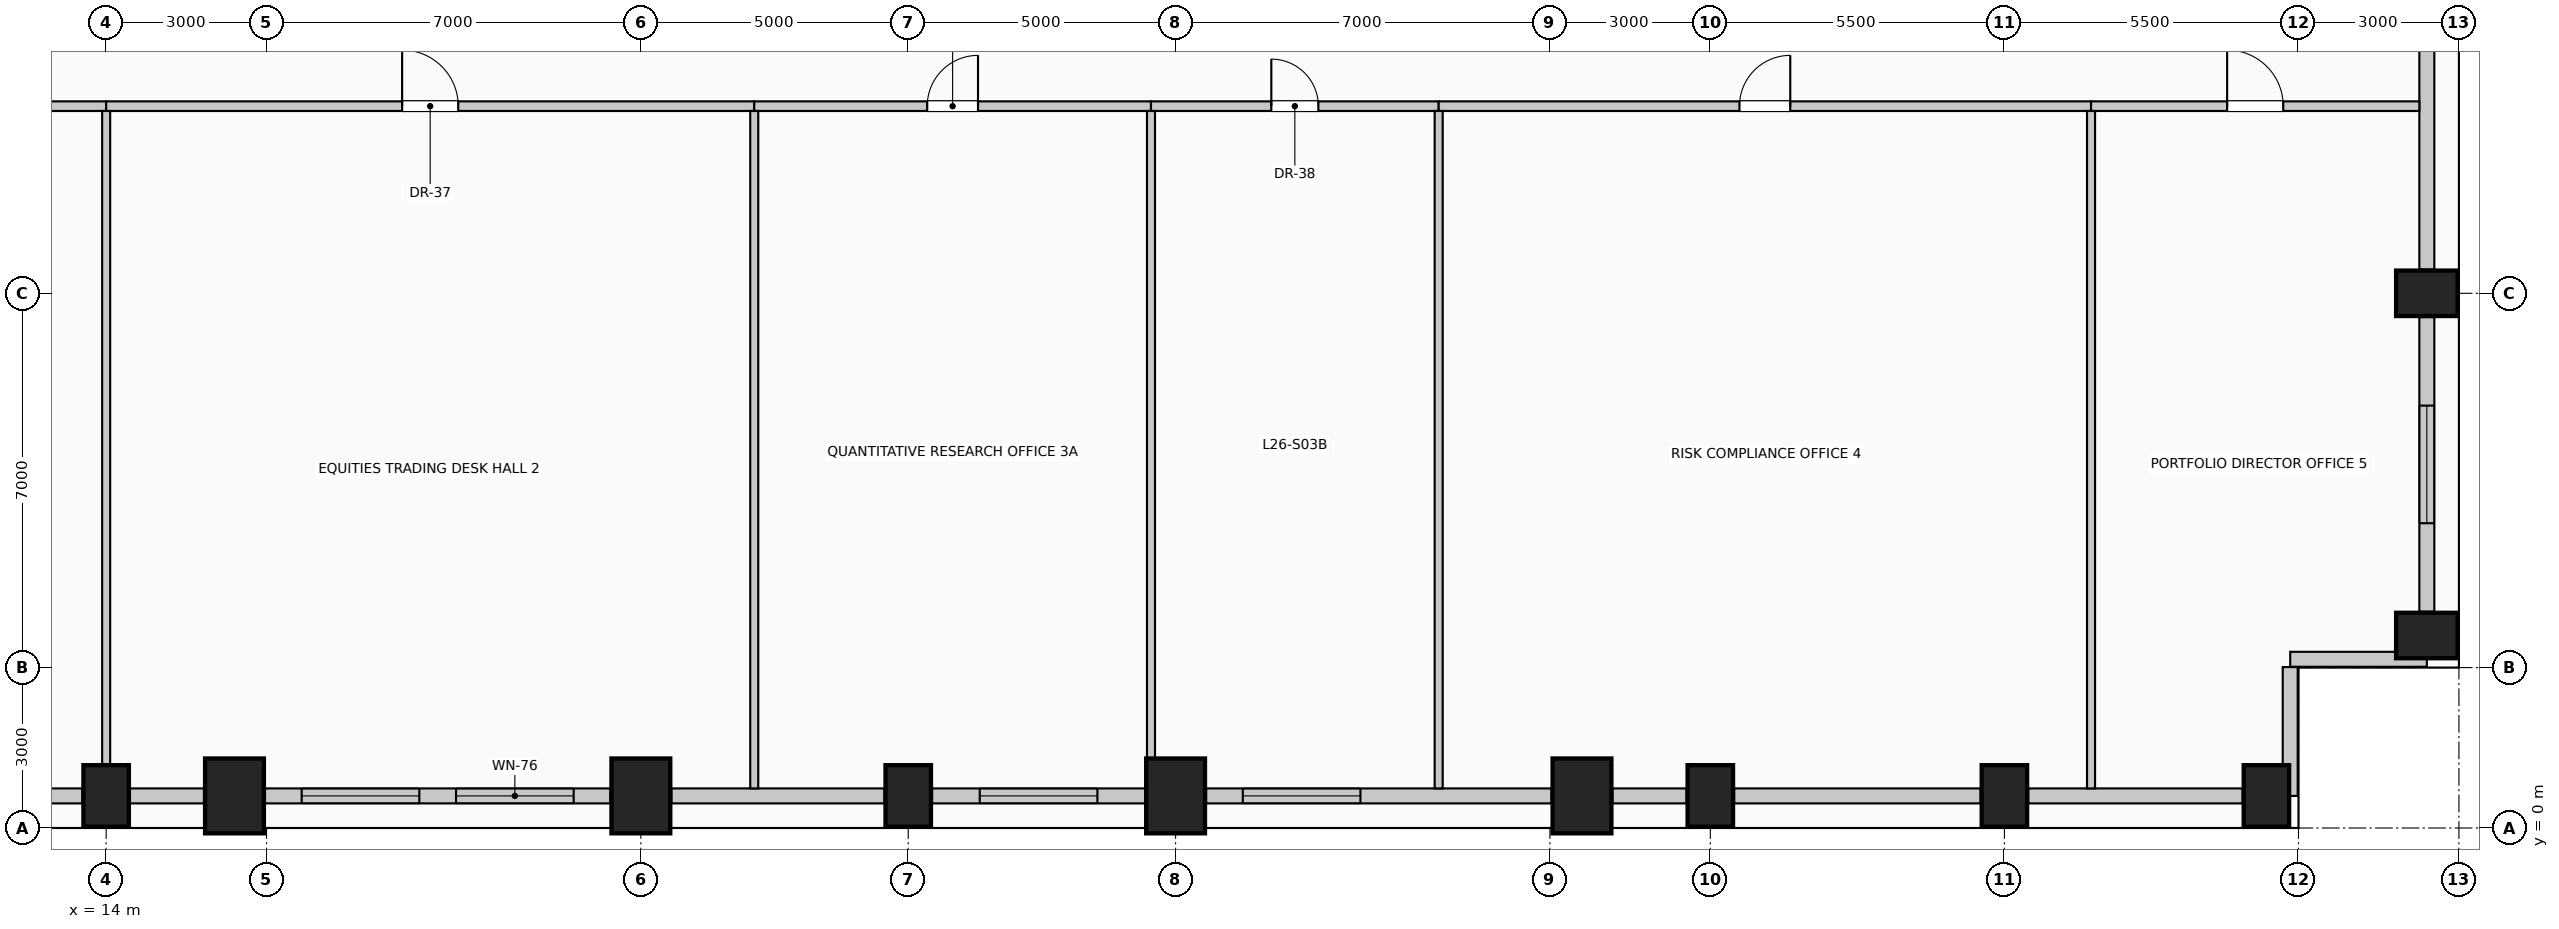
"""IFC4 building model, lengths in metres.
Left out: names, types, materials, properties, quantities, classifications, styles, units other than length and angle.
Written with IfcOpenShell. Run it as: python <this file> out.ifc"""

import sys

from ifc_helpers import new_model, si_unit, direction, frame, frame_2d, origin, origin_2d, place, context, subcontext, project, spatial, rectangle, extrude, element, fill, save


model = new_model("IFC4")
c1 = context("Model", 3, precision=1e-05, world=origin(), true_north=direction((0.0, 1.0)))
c2 = subcontext(c1, "Body", "Model", "MODEL_VIEW")
j1 = project(units=[si_unit("LENGTHUNIT", "METRE"), si_unit("PLANEANGLEUNIT", "RADIAN")], contexts=[c1])
p1 = place(None, origin())
s1 = spatial("IfcSite", under=j1, at=p1, CompositionType="ELEMENT")
p2 = place(p1, origin())
s2 = spatial("IfcBuilding", under=s1, at=p2, CompositionType="ELEMENT")
p3 = place(p2, frame((0.0, 0.0, 108.6)))
s3 = spatial("IfcBuildingStorey", under=s2, at=p3, CompositionType="ELEMENT", Elevation=108.6)
p4 = place(p3, frame((14.0, 0.6, 0.0), z_axis=(0.0, 0.0, 1.0), x_axis=(1.0, 0.0, 0.0)))
e1 = element("IfcColumn", 1, at=p4, inside=s3, PredefinedType="COLUMN", context=c2, shape_type="SweptSolid", body=[
    extrude(rectangle(XDim=0.85, YDim=1.15, at=origin_2d()), origin(), (0.0, 0.0, 1.0), 4.0),
])
for number, where, z_axis, x_axis in (
    (2, (16.4, 0.6, 0.0), (0.0, 0.0, 1.0), (1.0, 0.0, 0.0)),
    (3, (24.0, 0.6, 0.0), (0.0, 0.0, 1.0), (1.0, 0.0, 0.0)),
):
    element("IfcColumn", number, at=place(p3, frame(where, z_axis=z_axis, x_axis=x_axis)), inside=s3, PredefinedType="COLUMN", context=c2, shape_type="SweptSolid", body=[
        extrude(rectangle(XDim=1.1, YDim=1.4, at=origin_2d()), origin(), (0.0, 0.0, 1.0), 4.0),
    ])
p5 = place(p3, frame((29.0, 0.6, 0.0), z_axis=(0.0, 0.0, 1.0), x_axis=(1.0, 0.0, 0.0)))
e4 = element("IfcColumn", 4, at=p5, inside=s3, PredefinedType="COLUMN", context=c2, shape_type="SweptSolid", body=[
    extrude(rectangle(XDim=0.85, YDim=1.15, at=origin_2d()), origin(), (0.0, 0.0, 1.0), 4.0),
])
for number, where, z_axis, x_axis in (
    (5, (34.0, 0.6, 0.0), (0.0, 0.0, 1.0), (1.0, 0.0, 0.0)),
    (6, (41.6, 0.6, 0.0), (0.0, 0.0, 1.0), (1.0, 0.0, 0.0)),
):
    element("IfcColumn", number, at=place(p3, frame(where, z_axis=z_axis, x_axis=x_axis)), inside=s3, PredefinedType="COLUMN", context=c2, shape_type="SweptSolid", body=[
        extrude(rectangle(XDim=1.1, YDim=1.4, at=origin_2d()), origin(), (0.0, 0.0, 1.0), 4.0),
    ])
for number, where, z_axis, x_axis in (
    (7, (44.0, 0.6, 0.0), (0.0, 0.0, 1.0), (1.0, 0.0, 0.0)),
    (8, (49.5, 0.6, 0.0), (0.0, 0.0, 1.0), (1.0, 0.0, 0.0)),
    (9, (54.4, 0.6, 0.0), (0.0, 0.0, 1.0), (1.0, 0.0, 0.0)),
    (10, (57.4, 3.6, 0.0), (0.0, 0.0, 1.0), (0.0, 1.0, 0.0)),
    (11, (57.4, 10.0, 0.0), (0.0, 0.0, 1.0), (0.0, 1.0, 0.0)),
):
    element("IfcColumn", number, at=place(p3, frame(where, z_axis=z_axis, x_axis=x_axis)), inside=s3, PredefinedType="COLUMN", context=c2, shape_type="SweptSolid", body=[
        extrude(rectangle(XDim=0.85, YDim=1.15, at=origin_2d()), origin(), (0.0, 0.0, 1.0), 4.0),
    ])
p6 = place(p3, frame((13.555, 0.6, 0.0), z_axis=(0.0, 0.0, 1.0), x_axis=(-1.0, 0.0, 0.0)))
e12 = element("IfcWall", 12, at=p6, inside=s3, PredefinedType="SOLIDWALL", context=c2, shape_type="SweptSolid", body=[
    extrude(rectangle(XDim=4.61, YDim=0.28, at=frame_2d((2.305, 0.0))), origin(), (0.0, 0.0, 1.0), 2.875),
])
p7 = place(p3, frame((15.83, 0.6, 0.0), z_axis=(0.0, 0.0, 1.0), x_axis=(-1.0, 0.0, 0.0)))
e13 = element("IfcWall", 13, at=p7, inside=s3, PredefinedType="SOLIDWALL", context=c2, shape_type="SweptSolid", body=[
    extrude(rectangle(XDim=1.385, YDim=0.28, at=frame_2d((0.692, 0.0))), origin(), (0.0, 0.0, 1.0), 2.875),
])
p8 = place(p3, frame((23.43, 0.6, 0.0), z_axis=(0.0, 0.0, 1.0), x_axis=(-1.0, 0.0, 0.0)))
e14 = element("IfcWall", 14, at=p8, inside=s3, PredefinedType="SOLIDWALL", context=c2, shape_type="SweptSolid", body=[
    extrude(rectangle(XDim=6.46, YDim=0.28, at=frame_2d((3.23, 0.0))), origin(), (0.0, 0.0, 1.0), 2.875),
])
p9 = place(p8, frame((0.687, 0.0, 0.5)))
e15 = element("IfcOpeningElement", 15, at=p9, cuts=e14, PredefinedType="OPENING", context=c2, shape_type="SweptSolid", body=[
    extrude(rectangle(XDim=2.2, YDim=1.95, at=frame_2d((1.1, 0.975))), frame((0.0, 0.15, 0.0), z_axis=(0.0, -1.0, 0.0), x_axis=(1.0, 0.0, 0.0)), (0.0, 0.0, 1.0), 0.3),
])
p10 = place(p8, frame((3.573, 0.0, 0.5)))
e16 = element("IfcOpeningElement", 16, at=p10, cuts=e14, PredefinedType="OPENING", context=c2, shape_type="SweptSolid", body=[
    extrude(rectangle(XDim=2.2, YDim=1.95, at=frame_2d((1.1, 0.975))), frame((0.0, 0.15, 0.0), z_axis=(0.0, -1.0, 0.0), x_axis=(1.0, 0.0, 0.0)), (0.0, 0.0, 1.0), 0.3),
])
p11 = place(p3, frame((28.555, 0.6, 0.0), z_axis=(0.0, 0.0, 1.0), x_axis=(-1.0, 0.0, 0.0)))
e17 = element("IfcWall", 17, at=p11, inside=s3, PredefinedType="SOLIDWALL", context=c2, shape_type="SweptSolid", body=[
    extrude(rectangle(XDim=3.985, YDim=0.28, at=frame_2d((1.992, 0.0))), origin(), (0.0, 0.0, 1.0), 2.875),
])
p12 = place(p3, frame((33.43, 0.6, 0.0), z_axis=(0.0, 0.0, 1.0), x_axis=(-1.0, 0.0, 0.0)))
e18 = element("IfcWall", 18, at=p12, inside=s3, PredefinedType="SOLIDWALL", context=c2, shape_type="SweptSolid", body=[
    extrude(rectangle(XDim=3.985, YDim=0.28, at=frame_2d((1.992, 0.0))), origin(), (0.0, 0.0, 1.0), 2.875),
])
p13 = place(p12, frame((0.893, 0.0, 0.5)))
e19 = element("IfcOpeningElement", 19, at=p13, cuts=e18, PredefinedType="OPENING", context=c2, shape_type="SweptSolid", body=[
    extrude(rectangle(XDim=2.2, YDim=1.95, at=frame_2d((1.1, 0.975))), frame((0.0, 0.15, 0.0), z_axis=(0.0, -1.0, 0.0), x_axis=(1.0, 0.0, 0.0)), (0.0, 0.0, 1.0), 0.3),
])
p14 = place(p3, frame((41.03, 0.6, 0.0), z_axis=(0.0, 0.0, 1.0), x_axis=(-1.0, 0.0, 0.0)))
e20 = element("IfcWall", 20, at=p14, inside=s3, PredefinedType="SOLIDWALL", context=c2, shape_type="SweptSolid", body=[
    extrude(rectangle(XDim=6.46, YDim=0.28, at=frame_2d((3.23, 0.0))), origin(), (0.0, 0.0, 1.0), 2.875),
])
p15 = place(p14, frame((3.573, 0.0, 0.5)))
e21 = element("IfcOpeningElement", 21, at=p15, cuts=e20, PredefinedType="OPENING", context=c2, shape_type="SweptSolid", body=[
    extrude(rectangle(XDim=2.2, YDim=1.95, at=frame_2d((1.1, 0.975))), frame((0.0, 0.15, 0.0), z_axis=(0.0, -1.0, 0.0), x_axis=(1.0, 0.0, 0.0)), (0.0, 0.0, 1.0), 0.3),
])
p16 = place(p3, frame((43.555, 0.6, 0.0), z_axis=(0.0, 0.0, 1.0), x_axis=(-1.0, 0.0, 0.0)))
e22 = element("IfcWall", 22, at=p16, inside=s3, PredefinedType="SOLIDWALL", context=c2, shape_type="SweptSolid", body=[
    extrude(rectangle(XDim=1.385, YDim=0.28, at=frame_2d((0.692, 0.0))), origin(), (0.0, 0.0, 1.0), 2.875),
])
p17 = place(p3, frame((49.055, 0.6, 0.0), z_axis=(0.0, 0.0, 1.0), x_axis=(-1.0, 0.0, 0.0)))
e23 = element("IfcWall", 23, at=p17, inside=s3, PredefinedType="SOLIDWALL", context=c2, shape_type="SweptSolid", body=[
    extrude(rectangle(XDim=4.61, YDim=0.28, at=frame_2d((2.305, 0.0))), origin(), (0.0, 0.0, 1.0), 2.875),
])
p18 = place(p3, frame((53.955, 0.6, 0.0), z_axis=(0.0, 0.0, 1.0), x_axis=(-1.0, 0.0, 0.0)))
e24 = element("IfcWall", 24, at=p18, inside=s3, PredefinedType="SOLIDWALL", context=c2, shape_type="SweptSolid", body=[
    extrude(rectangle(XDim=4.01, YDim=0.28, at=frame_2d((2.005, 0.0))), origin(), (0.0, 0.0, 1.0), 2.875),
])
p19 = place(p3, frame((57.4, 9.555, 0.0), z_axis=(0.0, 0.0, 1.0), x_axis=(0.0, -1.0, 0.0)))
e25 = element("IfcWall", 25, at=p19, inside=s3, PredefinedType="SOLIDWALL", context=c2, shape_type="SweptSolid", body=[
    extrude(rectangle(XDim=5.51, YDim=0.28, at=frame_2d((2.755, 0.0))), origin(), (0.0, 0.0, 1.0), 2.875),
])
p20 = place(p19, frame((1.655, 0.0, 0.5)))
e26 = element("IfcOpeningElement", 26, at=p20, cuts=e25, PredefinedType="OPENING", context=c2, shape_type="SweptSolid", body=[
    extrude(rectangle(XDim=2.2, YDim=1.95, at=frame_2d((1.1, 0.975))), frame((0.0, 0.15, 0.0), z_axis=(0.0, -1.0, 0.0), x_axis=(1.0, 0.0, 0.0)), (0.0, 0.0, 1.0), 0.3),
])
p21 = place(p3, frame((57.4, 17.555, 0.0), z_axis=(0.0, 0.0, 1.0), x_axis=(0.0, -1.0, 0.0)))
e27 = element("IfcWall", 27, at=p21, inside=s3, PredefinedType="SOLIDWALL", context=c2, shape_type="SweptSolid", body=[
    extrude(rectangle(XDim=7.11, YDim=0.28, at=frame_2d((3.555, 0.0))), origin(), (0.0, 0.0, 1.0), 2.875),
])
p22 = place(p3, frame((57.4, 3.155, 0.0), z_axis=(0.0, 0.0, 1.0), x_axis=(-1.0, 0.0, 0.0)))
e28 = element("IfcWall", 28, at=p22, inside=s3, PredefinedType="SOLIDWALL", context=c2, shape_type="SweptSolid", body=[
    extrude(rectangle(XDim=2.555, YDim=0.28, at=frame_2d((1.277, 0.0))), origin(), (0.0, 0.0, 1.0), 3.725),
])
p23 = place(p3, frame((54.845, 3.01, 0.0), z_axis=(0.0, 0.0, 1.0), x_axis=(0.0, -1.0, 0.0)))
e29 = element("IfcWall", 29, at=p23, inside=s3, PredefinedType="SOLIDWALL", context=c2, shape_type="SweptSolid", body=[
    extrude(rectangle(XDim=2.41, YDim=0.28, at=frame_2d((1.205, 0.0))), origin(), (0.0, 0.0, 1.0), 3.725),
])
p24 = place(p3, frame((0.74, 13.5, 0.0), z_axis=(0.0, 0.0, 1.0), x_axis=(1.0, 0.0, 0.0)))
e30 = element("IfcWall", 30, at=p24, inside=s3, PredefinedType="PARTITIONING", context=c2, shape_type="SweptSolid", body=[
    extrude(rectangle(XDim=13.26, YDim=0.18, at=frame_2d((6.63, 0.0))), origin(), (0.0, 0.0, 1.0), 3.725),
])
p25 = place(p24, frame((6.155, 0.0, 0.0)))
e31 = element("IfcOpeningElement", 31, at=p25, cuts=e30, PredefinedType="OPENING", context=c2, shape_type="SweptSolid", body=[
    extrude(rectangle(XDim=0.95, YDim=2.15, at=frame_2d((0.475, 1.075))), frame((0.0, 0.1, 0.0), z_axis=(0.0, -1.0, 0.0), x_axis=(1.0, 0.0, 0.0)), (0.0, 0.0, 1.0), 0.2),
])
p26 = place(p3, frame((14.0, 13.5, 0.0), z_axis=(0.0, 0.0, 1.0), x_axis=(1.0, 0.0, 0.0)))
e32 = element("IfcWall", 32, at=p26, inside=s3, PredefinedType="PARTITIONING", context=c2, shape_type="SweptSolid", body=[
    extrude(rectangle(XDim=12.12, YDim=0.18, at=frame_2d((6.06, 0.0))), origin(), (0.0, 0.0, 1.0), 3.725),
])
p27 = place(p26, frame((5.535, 0.0, 0.0)))
e33 = element("IfcOpeningElement", 33, at=p27, cuts=e32, PredefinedType="OPENING", context=c2, shape_type="SweptSolid", body=[
    extrude(rectangle(XDim=1.05, YDim=2.15, at=frame_2d((0.525, 1.075))), frame((0.0, 0.1, 0.0), z_axis=(0.0, -1.0, 0.0), x_axis=(1.0, 0.0, 0.0)), (0.0, 0.0, 1.0), 0.2),
])
p28 = place(p3, frame((26.12, 13.5, 0.0), z_axis=(0.0, 0.0, 1.0), x_axis=(1.0, 0.0, 0.0)))
e34 = element("IfcWall", 34, at=p28, inside=s3, PredefinedType="PARTITIONING", context=c2, shape_type="SweptSolid", body=[
    extrude(rectangle(XDim=7.42, YDim=0.18, at=frame_2d((3.71, 0.0))), origin(), (0.0, 0.0, 1.0), 3.725),
])
p29 = place(p28, frame((3.235, 0.0, 0.0)))
e35 = element("IfcOpeningElement", 35, at=p29, cuts=e34, PredefinedType="OPENING", context=c2, shape_type="SweptSolid", body=[
    extrude(rectangle(XDim=0.95, YDim=2.15, at=frame_2d((0.475, 1.075))), frame((0.0, 0.1, 0.0), z_axis=(0.0, -1.0, 0.0), x_axis=(1.0, 0.0, 0.0)), (0.0, 0.0, 1.0), 0.2),
])
p30 = place(p3, frame((33.54, 13.5, 0.0), z_axis=(0.0, 0.0, 1.0), x_axis=(1.0, 0.0, 0.0)))
e36 = element("IfcWall", 36, at=p30, inside=s3, PredefinedType="PARTITIONING", context=c2, shape_type="SweptSolid", body=[
    extrude(rectangle(XDim=5.38, YDim=0.18, at=frame_2d((2.69, 0.0))), origin(), (0.0, 0.0, 1.0), 3.725),
])
p31 = place(p30, frame((2.25, 0.0, 0.0)))
e37 = element("IfcOpeningElement", 37, at=p31, cuts=e36, PredefinedType="OPENING", context=c2, shape_type="SweptSolid", body=[
    extrude(rectangle(XDim=0.88, YDim=2.1, at=frame_2d((0.44, 1.05))), frame((0.0, 0.1, 0.0), z_axis=(0.0, -1.0, 0.0), x_axis=(1.0, 0.0, 0.0)), (0.0, 0.0, 1.0), 0.2),
])
p32 = place(p3, frame((38.92, 13.5, 0.0), z_axis=(0.0, 0.0, 1.0), x_axis=(1.0, 0.0, 0.0)))
e38 = element("IfcWall", 38, at=p32, inside=s3, PredefinedType="PARTITIONING", context=c2, shape_type="SweptSolid", body=[
    extrude(rectangle(XDim=12.2, YDim=0.18, at=frame_2d((6.1, 0.0))), origin(), (0.0, 0.0, 1.0), 3.725),
])
p33 = place(p32, frame((5.625, 0.0, 0.0)))
e39 = element("IfcOpeningElement", 39, at=p33, cuts=e38, PredefinedType="OPENING", context=c2, shape_type="SweptSolid", body=[
    extrude(rectangle(XDim=0.95, YDim=2.15, at=frame_2d((0.475, 1.075))), frame((0.0, 0.1, 0.0), z_axis=(0.0, -1.0, 0.0), x_axis=(1.0, 0.0, 0.0)), (0.0, 0.0, 1.0), 0.2),
])
p34 = place(p3, frame((51.12, 13.5, 0.0), z_axis=(0.0, 0.0, 1.0), x_axis=(1.0, 0.0, 0.0)))
e40 = element("IfcWall", 40, at=p34, inside=s3, PredefinedType="PARTITIONING", context=c2, shape_type="SweptSolid", body=[
    extrude(rectangle(XDim=6.14, YDim=0.18, at=frame_2d((3.07, 0.0))), origin(), (0.0, 0.0, 1.0), 3.725),
])
p35 = place(p34, frame((2.545, 0.0, 0.0)))
e41 = element("IfcOpeningElement", 41, at=p35, cuts=e40, PredefinedType="OPENING", context=c2, shape_type="SweptSolid", body=[
    extrude(rectangle(XDim=1.05, YDim=2.15, at=frame_2d((0.525, 1.075))), frame((0.0, 0.1, 0.0), z_axis=(0.0, -1.0, 0.0), x_axis=(1.0, 0.0, 0.0)), (0.0, 0.0, 1.0), 0.2),
])
p36 = place(p3, frame((14.0, 1.175, 0.0), z_axis=(0.0, 0.0, 1.0), x_axis=(0.0, 1.0, 0.0)))
e42 = element("IfcWall", 42, at=p36, inside=s3, PredefinedType="PARTITIONING", context=c2, shape_type="SweptSolid", body=[
    extrude(rectangle(XDim=12.235, YDim=0.15, at=frame_2d((6.117, 0.0))), origin(), (0.0, 0.0, 1.0), 3.725),
])
p37 = place(p3, frame((26.12, 0.74, 0.0), z_axis=(0.0, 0.0, 1.0), x_axis=(0.0, 1.0, 0.0)))
e43 = element("IfcWall", 43, at=p37, inside=s3, PredefinedType="PARTITIONING", context=c2, shape_type="SweptSolid", body=[
    extrude(rectangle(XDim=12.67, YDim=0.15, at=frame_2d((6.335, 0.0))), origin(), (0.0, 0.0, 1.0), 3.725),
])
p38 = place(p3, frame((33.54, 1.3, 0.0), z_axis=(0.0, 0.0, 1.0), x_axis=(0.0, 1.0, 0.0)))
e44 = element("IfcWall", 44, at=p38, inside=s3, PredefinedType="PARTITIONING", context=c2, shape_type="SweptSolid", body=[
    extrude(rectangle(XDim=12.11, YDim=0.15, at=frame_2d((6.055, 0.0))), origin(), (0.0, 0.0, 1.0), 3.725),
])
for number, where, z_axis, x_axis in (
    (45, (38.92, 0.74, 0.0), (0.0, 0.0, 1.0), (0.0, 1.0, 0.0)),
    (46, (51.12, 0.74, 0.0), (0.0, 0.0, 1.0), (0.0, 1.0, 0.0)),
):
    element("IfcWall", number, at=place(p3, frame(where, z_axis=z_axis, x_axis=x_axis)), inside=s3, PredefinedType="PARTITIONING", context=c2, shape_type="SweptSolid", body=[
        extrude(rectangle(XDim=12.67, YDim=0.15, at=frame_2d((6.335, 0.0))), origin(), (0.0, 0.0, 1.0), 3.725),
    ])
p39 = place(p9, origin())
e47 = element("IfcWindow", 47, at=p39, inside=s3, PartitioningType="SINGLE_PANEL", PredefinedType="WINDOW", context=c2, shape_type="SweptSolid", body=[
    extrude(rectangle(XDim=2.2, YDim=1.95, at=frame_2d((1.1, 0.975))), frame((0.0, 0.03, 0.0), z_axis=(0.0, -1.0, 0.0), x_axis=(1.0, 0.0, 0.0)), (0.0, 0.0, 1.0), 0.06),
])
fill(e15, e47)
p40 = place(p10, origin())
e48 = element("IfcWindow", 48, at=p40, inside=s3, PartitioningType="SINGLE_PANEL", PredefinedType="WINDOW", context=c2, shape_type="SweptSolid", body=[
    extrude(rectangle(XDim=2.2, YDim=1.95, at=frame_2d((1.1, 0.975))), frame((0.0, 0.03, 0.0), z_axis=(0.0, -1.0, 0.0), x_axis=(1.0, 0.0, 0.0)), (0.0, 0.0, 1.0), 0.06),
])
fill(e16, e48)
p41 = place(p13, origin())
e49 = element("IfcWindow", 49, at=p41, inside=s3, PartitioningType="SINGLE_PANEL", PredefinedType="WINDOW", context=c2, shape_type="SweptSolid", body=[
    extrude(rectangle(XDim=2.2, YDim=1.95, at=frame_2d((1.1, 0.975))), frame((0.0, 0.03, 0.0), z_axis=(0.0, -1.0, 0.0), x_axis=(1.0, 0.0, 0.0)), (0.0, 0.0, 1.0), 0.06),
])
fill(e19, e49)
p42 = place(p15, origin())
e50 = element("IfcWindow", 50, at=p42, inside=s3, PartitioningType="SINGLE_PANEL", PredefinedType="WINDOW", context=c2, shape_type="SweptSolid", body=[
    extrude(rectangle(XDim=2.2, YDim=1.95, at=frame_2d((1.1, 0.975))), frame((0.0, 0.03, 0.0), z_axis=(0.0, -1.0, 0.0), x_axis=(1.0, 0.0, 0.0)), (0.0, 0.0, 1.0), 0.06),
])
fill(e21, e50)
p43 = place(p20, origin())
e51 = element("IfcWindow", 51, at=p43, inside=s3, PartitioningType="SINGLE_PANEL", PredefinedType="WINDOW", context=c2, shape_type="SweptSolid", body=[
    extrude(rectangle(XDim=2.2, YDim=1.95, at=frame_2d((1.1, 0.975))), frame((0.0, 0.03, 0.0), z_axis=(0.0, -1.0, 0.0), x_axis=(1.0, 0.0, 0.0)), (0.0, 0.0, 1.0), 0.06),
])
fill(e26, e51)
p44 = place(p27, origin())
e52 = element("IfcDoor", 52, at=p44, inside=s3, OperationType="SINGLE_SWING_LEFT", PredefinedType="DOOR", context=c2, shape_type="SweptSolid", body=[
    extrude(rectangle(XDim=1.05, YDim=2.15, at=frame_2d((0.525, 1.075))), frame((0.0, 0.025, 0.0), z_axis=(0.0, -1.0, 0.0), x_axis=(1.0, 0.0, 0.0)), (0.0, 0.0, 1.0), 0.05),
])
fill(e33, e52)
p45 = place(p29, origin())
e53 = element("IfcDoor", 53, at=p45, inside=s3, OperationType="SINGLE_SWING_RIGHT", PredefinedType="DOOR", context=c2, shape_type="SweptSolid", body=[
    extrude(rectangle(XDim=0.95, YDim=2.15, at=frame_2d((0.475, 1.075))), frame((0.0, 0.025, 0.0), z_axis=(0.0, -1.0, 0.0), x_axis=(1.0, 0.0, 0.0)), (0.0, 0.0, 1.0), 0.05),
])
fill(e35, e53)
p46 = place(p31, origin())
e54 = element("IfcDoor", 54, at=p46, inside=s3, OperationType="SINGLE_SWING_LEFT", PredefinedType="DOOR", context=c2, shape_type="SweptSolid", body=[
    extrude(rectangle(XDim=0.88, YDim=2.1, at=frame_2d((0.44, 1.05))), frame((0.0, 0.025, 0.0), z_axis=(0.0, -1.0, 0.0), x_axis=(1.0, 0.0, 0.0)), (0.0, 0.0, 1.0), 0.05),
])
fill(e37, e54)
p47 = place(p33, origin())
e55 = element("IfcDoor", 55, at=p47, inside=s3, OperationType="SINGLE_SWING_RIGHT", PredefinedType="DOOR", context=c2, shape_type="SweptSolid", body=[
    extrude(rectangle(XDim=0.95, YDim=2.15, at=frame_2d((0.475, 1.075))), frame((0.0, 0.025, 0.0), z_axis=(0.0, -1.0, 0.0), x_axis=(1.0, 0.0, 0.0)), (0.0, 0.0, 1.0), 0.05),
])
fill(e39, e55)
p48 = place(p35, origin())
e56 = element("IfcDoor", 56, at=p48, inside=s3, OperationType="SINGLE_SWING_LEFT", PredefinedType="DOOR", context=c2, shape_type="SweptSolid", body=[
    extrude(rectangle(XDim=1.05, YDim=2.15, at=frame_2d((0.525, 1.075))), frame((0.0, 0.025, 0.0), z_axis=(0.0, -1.0, 0.0), x_axis=(1.0, 0.0, 0.0)), (0.0, 0.0, 1.0), 0.05),
])
fill(e41, e56)
save(model, sys.argv[1])
